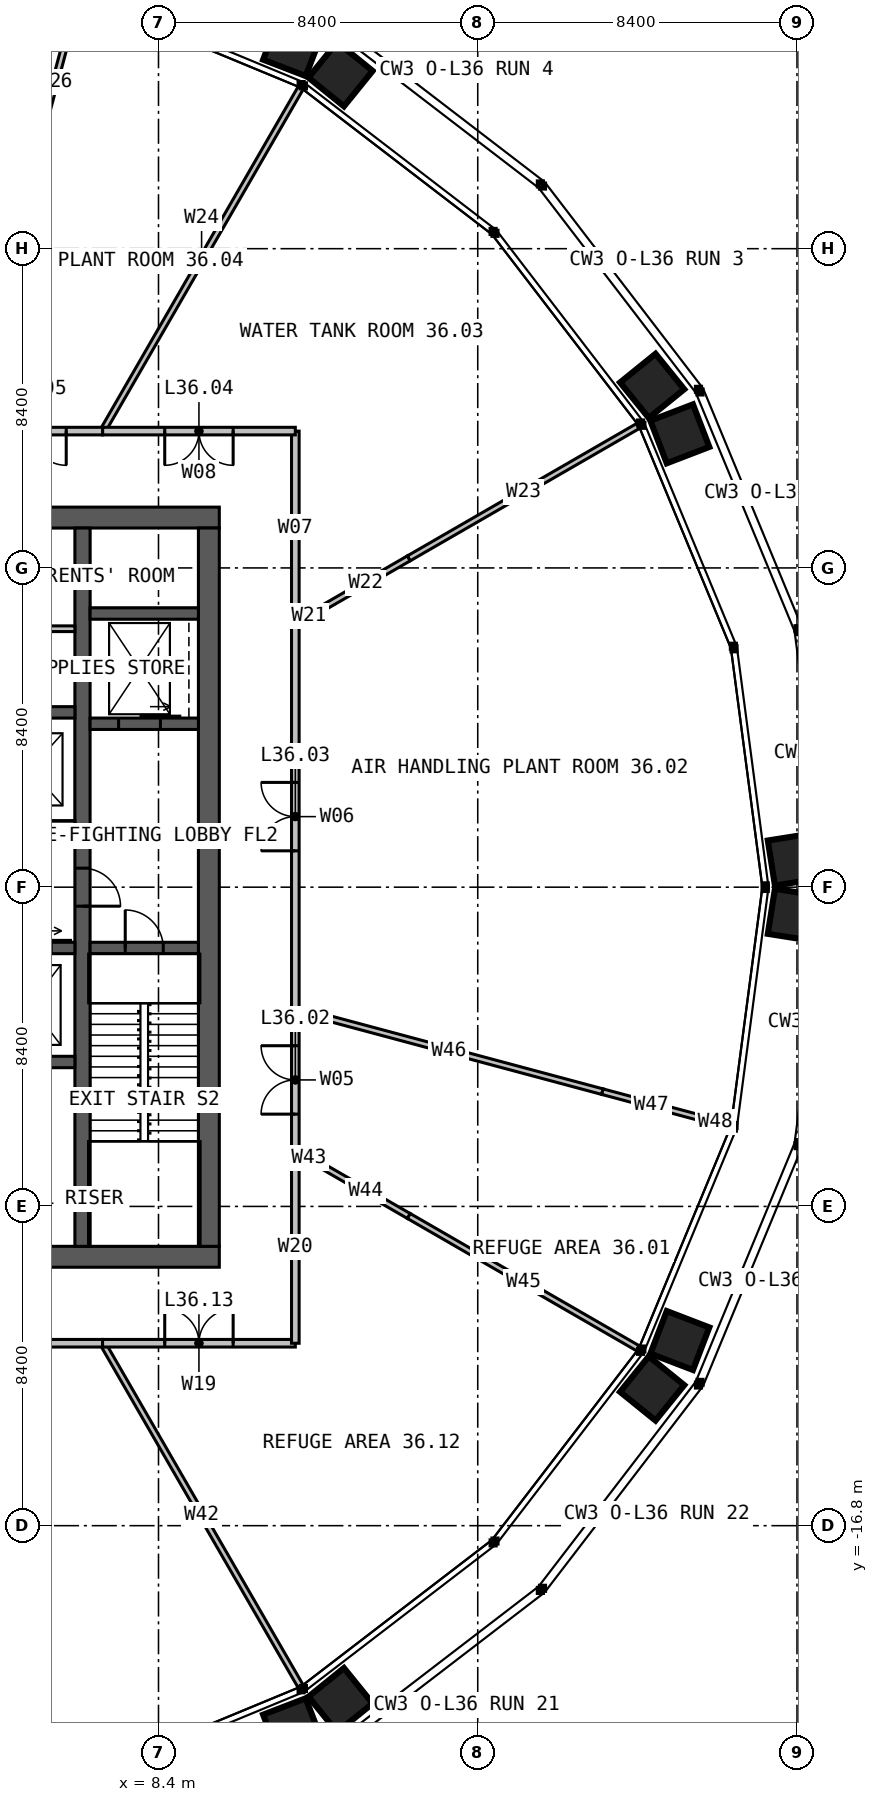
"""IFC4 building model, lengths in metres.
Left out: names, types, materials, properties, quantities, classifications, styles, units other than length and angle.
Written with IfcOpenShell. Run it as: python <this file> out.ifc"""

import sys

from ifc_helpers import new_model, si_unit, direction, frame, frame_2d, origin, place, context, subcontext, project, spatial, rectangle, extrude, element, fill, save


model = new_model("IFC4")
c1 = context("Model", 3, precision=1e-05, world=origin(), true_north=direction((0.0, 1.0)))
c2 = subcontext(c1, "Body", "Model", "MODEL_VIEW")
j1 = project(units=[si_unit("LENGTHUNIT", "METRE"), si_unit("PLANEANGLEUNIT", "RADIAN")], contexts=[c1])
p1 = place(None, origin())
s1 = spatial("IfcSite", under=j1, at=p1, CompositionType="ELEMENT")
p2 = place(p1, origin())
s2 = spatial("IfcBuilding", under=s1, at=p2, CompositionType="ELEMENT")
p3 = place(p2, frame((0.0, 0.0, 150.0)))
s3 = spatial("IfcBuildingStorey", under=s2, at=p3, CompositionType="ELEMENT", Elevation=150.0)
p4 = place(p3, frame((-10.0, 9.725, 0.0), z_axis=(0.0, 0.0, 1.0), x_axis=(1.0, 0.0, 0.0)))
e1 = element("IfcWall", 1, at=p4, inside=s3, PredefinedType="SOLIDWALL", context=c2, shape_type="SweptSolid", body=[
    extrude(rectangle(XDim=20.0, YDim=0.55, at=frame_2d((10.0, 0.0))), origin(), (0.0, 0.0, 1.0), 5.0),
])
p5 = place(p4, frame((9.4, 0.0, 0.0)))
e2 = element("IfcOpeningElement", 2, at=p5, cuts=e1, PredefinedType="OPENING", context=c2, shape_type="SweptSolid", body=[
    extrude(rectangle(XDim=1.2, YDim=2.2, at=frame_2d((0.6, 1.1))), frame((0.0, 0.285, 0.0), z_axis=(0.0, -1.0, 0.0), x_axis=(1.0, 0.0, 0.0)), (0.0, 0.0, 1.0), 0.57),
])
p6 = place(p3, frame((10.0, -9.725, 0.0), z_axis=(0.0, 0.0, 1.0), x_axis=(-1.0, 0.0, 0.0)))
e3 = element("IfcWall", 3, at=p6, inside=s3, PredefinedType="SOLIDWALL", context=c2, shape_type="SweptSolid", body=[
    extrude(rectangle(XDim=20.0, YDim=0.55, at=frame_2d((10.0, 0.0))), origin(), (0.0, 0.0, 1.0), 5.0),
])
p7 = place(p6, frame((6.875, 0.0, 0.0)))
e4 = element("IfcOpeningElement", 4, at=p7, cuts=e3, PredefinedType="OPENING", context=c2, shape_type="SweptSolid", body=[
    extrude(rectangle(XDim=1.2, YDim=2.2, at=frame_2d((0.6, 1.1))), frame((0.0, 0.285, 0.0), z_axis=(0.0, -1.0, 0.0), x_axis=(1.0, 0.0, 0.0)), (0.0, 0.0, 1.0), 0.57),
])
p8 = place(p3, frame((9.725, -9.45, 0.0), z_axis=(0.0, 0.0, 1.0), x_axis=(0.0, 1.0, 0.0)))
e5 = element("IfcWall", 5, at=p8, inside=s3, PredefinedType="SOLIDWALL", context=c2, shape_type="SweptSolid", body=[
    extrude(rectangle(XDim=18.9, YDim=0.55, at=frame_2d((9.45, 0.0))), origin(), (0.0, 0.0, 1.0), 5.0),
])
p9 = place(p3, frame((6.4, 9.45, 0.0), z_axis=(0.0, 0.0, 1.0), x_axis=(0.0, -1.0, 0.0)))
e6 = element("IfcWall", 6, at=p9, inside=s3, PredefinedType="SOLIDWALL", context=c2, shape_type="SweptSolid", body=[
    extrude(rectangle(XDim=18.9, YDim=0.4, at=frame_2d((9.45, 0.0))), origin(), (0.0, 0.0, 1.0), 5.0),
])
p10 = place(p9, frame((8.95, 0.0, 0.0)))
e7 = element("IfcOpeningElement", 7, at=p10, cuts=e6, PredefinedType="OPENING", context=c2, shape_type="SweptSolid", body=[
    extrude(rectangle(XDim=1.0, YDim=2.2, at=frame_2d((0.5, 1.1))), frame((0.0, 0.21, 0.0), z_axis=(0.0, -1.0, 0.0), x_axis=(1.0, 0.0, 0.0)), (0.0, 0.0, 1.0), 0.42),
])
for number, where, z_axis, x_axis in (
    (8, (1.35, 1.6, 0.0), (0.0, 0.0, 1.0), (1.0, 0.0, 0.0)),
    (9, (1.35, 4.6, 0.0), (0.0, 0.0, 1.0), (1.0, 0.0, 0.0)),
):
    element("IfcWall", number, at=place(p3, frame(where, z_axis=z_axis, x_axis=x_axis)), inside=s3, PredefinedType="SOLIDWALL", context=c2, shape_type="SweptSolid", body=[
        extrude(rectangle(XDim=4.85, YDim=0.3, at=frame_2d((2.425, 0.0))), origin(), (0.0, 0.0, 1.0), 5.0),
    ])
p11 = place(p3, frame((3.85, -1.6, 0.0), z_axis=(0.0, 0.0, 1.0), x_axis=(1.0, 0.0, 0.0)))
e10 = element("IfcWall", 10, at=p11, inside=s3, PredefinedType="SOLIDWALL", context=c2, shape_type="SweptSolid", body=[
    extrude(rectangle(XDim=2.35, YDim=0.3, at=frame_2d((1.175, 0.0))), origin(), (0.0, 0.0, 1.0), 5.0),
])
p12 = place(p11, frame((0.625, 0.0, 0.0)))
e11 = element("IfcOpeningElement", 11, at=p12, cuts=e10, PredefinedType="OPENING", context=c2, shape_type="SweptSolid", body=[
    extrude(rectangle(XDim=1.1, YDim=2.2, at=frame_2d((0.55, 1.1))), frame((0.0, 0.16, 0.0), z_axis=(0.0, -1.0, 0.0), x_axis=(1.0, 0.0, 0.0)), (0.0, 0.0, 1.0), 0.32),
])
p13 = place(p3, frame((3.85, -4.6, 0.0), z_axis=(0.0, 0.0, 1.0), x_axis=(1.0, 0.0, 0.0)))
e12 = element("IfcWall", 12, at=p13, inside=s3, PredefinedType="SOLIDWALL", context=c2, shape_type="SweptSolid", body=[
    extrude(rectangle(XDim=2.35, YDim=0.3, at=frame_2d((1.175, 0.0))), origin(), (0.0, 0.0, 1.0), 5.0),
])
p14 = place(p3, frame((6.6, -1.6, 0.0), z_axis=(0.0, 0.0, 1.0), x_axis=(1.0, 0.0, 0.0)))
e13 = element("IfcWall", 13, at=p14, inside=s3, PredefinedType="SOLIDWALL", context=c2, shape_type="SweptSolid", body=[
    extrude(rectangle(XDim=2.85, YDim=0.3, at=frame_2d((1.425, 0.0))), origin(), (0.0, 0.0, 1.0), 5.0),
])
p15 = place(p14, frame((0.925, 0.0, 0.0)))
e14 = element("IfcOpeningElement", 14, at=p15, cuts=e13, PredefinedType="OPENING", context=c2, shape_type="SweptSolid", body=[
    extrude(rectangle(XDim=1.0, YDim=2.2, at=frame_2d((0.5, 1.1))), frame((0.0, 0.16, 0.0), z_axis=(0.0, -1.0, 0.0), x_axis=(1.0, 0.0, 0.0)), (0.0, 0.0, 1.0), 0.32),
])
p16 = place(p3, frame((6.6, 4.3, 0.0), z_axis=(0.0, 0.0, 1.0), x_axis=(1.0, 0.0, 0.0)))
e15 = element("IfcWall", 15, at=p16, inside=s3, PredefinedType="SOLIDWALL", context=c2, shape_type="SweptSolid", body=[
    extrude(rectangle(XDim=2.85, YDim=0.3, at=frame_2d((1.425, 0.0))), origin(), (0.0, 0.0, 1.0), 5.0),
])
p17 = place(p16, frame((0.75, 0.0, 0.0)))
e16 = element("IfcOpeningElement", 16, at=p17, cuts=e15, PredefinedType="OPENING", context=c2, shape_type="SweptSolid", body=[
    extrude(rectangle(XDim=1.1, YDim=2.2, at=frame_2d((0.55, 1.1))), frame((0.0, 0.16, 0.0), z_axis=(0.0, -1.0, 0.0), x_axis=(1.0, 0.0, 0.0)), (0.0, 0.0, 1.0), 0.32),
])
p18 = place(p3, frame((6.6, 7.2, 0.0), z_axis=(0.0, 0.0, 1.0), x_axis=(1.0, 0.0, 0.0)))
e17 = element("IfcWall", 17, at=p18, inside=s3, PredefinedType="SOLIDWALL", context=c2, shape_type="SweptSolid", body=[
    extrude(rectangle(XDim=2.85, YDim=0.3, at=frame_2d((1.425, 0.0))), origin(), (0.0, 0.0, 1.0), 5.0),
])
p19 = place(p3, frame((1.35, 6.8, 0.0), z_axis=(0.0, 0.0, 1.0), x_axis=(1.0, 0.0, 0.0)))
e18 = element("IfcWall", 18, at=p19, inside=s3, PredefinedType="PARTITIONING", context=c2, shape_type="SweptSolid", body=[
    extrude(rectangle(XDim=4.85, YDim=0.15, at=frame_2d((2.425, 0.0))), origin(), (0.0, 0.0, 1.0), 4.75),
])
p20 = place(p19, frame((3.15, 0.0, 0.0)))
e19 = element("IfcOpeningElement", 19, at=p20, cuts=e18, PredefinedType="OPENING", context=c2, shape_type="SweptSolid", body=[
    extrude(rectangle(XDim=0.9, YDim=2.2, at=frame_2d((0.45, 1.1))), frame((0.0, 0.085, 0.0), z_axis=(0.0, -1.0, 0.0), x_axis=(1.0, 0.0, 0.0)), (0.0, 0.0, 1.0), 0.17),
])
p21 = place(p3, frame((12.0, -6.928, 0.0), z_axis=(0.0, 0.0, 1.0), x_axis=(0.86608282171, -0.499900536046, 0.0)))
e20 = element("IfcWall", 20, at=p21, inside=s3, PredefinedType="PARTITIONING", context=c2, shape_type="SweptSolid", body=[
    extrude(rectangle(XDim=0.831, YDim=0.15, at=frame_2d((0.416, 0.0))), origin(), (0.0, 0.0, 1.0), 4.8),
])
p22 = place(p3, frame((12.719, -7.344, 0.0), z_axis=(0.0, 0.0, 1.0), x_axis=(0.866002361659, -0.500039908008, 0.0)))
e21 = element("IfcWall", 21, at=p22, inside=s3, PredefinedType="PARTITIONING", context=c2, shape_type="SweptSolid", body=[
    extrude(rectangle(XDim=2.618, YDim=0.15, at=frame_2d((1.309, 0.0))), origin(), (0.0, 0.0, 1.0), 3.79),
])
p23 = place(p3, frame((14.987, -8.653, 0.0), z_axis=(0.0, 0.0, 1.0), x_axis=(0.86602409414, -0.500002268364, 0.0)))
e22 = element("IfcWall", 22, at=p23, inside=s3, PredefinedType="PARTITIONING", context=c2, shape_type="SweptSolid", body=[
    extrude(rectangle(XDim=6.974, YDim=0.15, at=frame_2d((3.487, 0.0))), origin(), (0.0, 0.0, 1.0), 4.8),
])
p24 = place(p3, frame((12.0, -3.215, 0.0), z_axis=(0.0, 0.0, 1.0), x_axis=(0.965920824038, -0.258837713037, 0.0)))
e23 = element("IfcWall", 23, at=p24, inside=s3, PredefinedType="PARTITIONING", context=c2, shape_type="SweptSolid", body=[
    extrude(rectangle(XDim=8.365, YDim=0.15, at=frame_2d((4.183, 0.0))), origin(), (0.0, 0.0, 1.0), 4.8),
])
p25 = place(p3, frame((20.08, -5.381, 0.0), z_axis=(0.0, 0.0, 1.0), x_axis=(0.965936190415, -0.258780362559, 0.0)))
e24 = element("IfcWall", 24, at=p25, inside=s3, PredefinedType="PARTITIONING", context=c2, shape_type="SweptSolid", body=[
    extrude(rectangle(XDim=2.664, YDim=0.15, at=frame_2d((1.332, 0.0))), origin(), (0.0, 0.0, 1.0), 3.79),
])
p26 = place(p3, frame((22.654, -6.07, 0.0), z_axis=(0.0, 0.0, 1.0), x_axis=(0.96592035307, -0.258839470569, 0.0)))
e25 = element("IfcWall", 25, at=p26, inside=s3, PredefinedType="PARTITIONING", context=c2, shape_type="SweptSolid", body=[
    extrude(rectangle(XDim=0.826, YDim=0.15, at=frame_2d((0.413, 0.0))), origin(), (0.0, 0.0, 1.0), 4.8),
])
p27 = place(p3, frame((12.0, 6.928, 0.0), z_axis=(0.0, 0.0, 1.0), x_axis=(0.86608282171, 0.499900536046, 0.0)))
e26 = element("IfcWall", 26, at=p27, inside=s3, PredefinedType="PARTITIONING", context=c2, shape_type="SweptSolid", body=[
    extrude(rectangle(XDim=0.831, YDim=0.15, at=frame_2d((0.416, 0.0))), origin(), (0.0, 0.0, 1.0), 4.8),
])
p28 = place(p3, frame((12.719, 7.344, 0.0), z_axis=(0.0, 0.0, 1.0), x_axis=(0.866002361659, 0.500039908008, 0.0)))
e27 = element("IfcWall", 27, at=p28, inside=s3, PredefinedType="PARTITIONING", context=c2, shape_type="SweptSolid", body=[
    extrude(rectangle(XDim=2.618, YDim=0.15, at=frame_2d((1.309, 0.0))), origin(), (0.0, 0.0, 1.0), 3.79),
])
p29 = place(p3, frame((14.987, 8.653, 0.0), z_axis=(0.0, 0.0, 1.0), x_axis=(0.86602409414, 0.500002268364, 0.0)))
e28 = element("IfcWall", 28, at=p29, inside=s3, PredefinedType="PARTITIONING", context=c2, shape_type="SweptSolid", body=[
    extrude(rectangle(XDim=6.974, YDim=0.15, at=frame_2d((3.487, 0.0))), origin(), (0.0, 0.0, 1.0), 4.8),
])
p30 = place(p3, frame((6.928, 12.0, 0.0), z_axis=(0.0, 0.0, 1.0), x_axis=(0.500003616288, 0.866023315909, 0.0)))
e29 = element("IfcWall", 29, at=p30, inside=s3, PredefinedType="PARTITIONING", context=c2, shape_type="SweptSolid", body=[
    extrude(rectangle(XDim=10.423, YDim=0.15, at=frame_2d((5.211, 0.0))), origin(), (0.0, 0.0, 1.0), 4.8),
])
p31 = place(p3, frame((5.279, 19.702, 0.0), z_axis=(0.0, 0.0, 1.0), x_axis=(0.258819472716, 0.96592571171, 0.0)))
e30 = element("IfcWall", 30, at=p31, inside=s3, PredefinedType="PARTITIONING", context=c2, shape_type="SweptSolid", body=[
    extrude(rectangle(XDim=3.073, YDim=0.15, at=frame_2d((1.537, 0.0))), origin(), (0.0, 0.0, 1.0), 3.79),
])
p32 = place(p3, frame((6.928, -12.0, 0.0), z_axis=(0.0, 0.0, 1.0), x_axis=(0.500003616288, -0.866023315909, 0.0)))
e31 = element("IfcWall", 31, at=p32, inside=s3, PredefinedType="PARTITIONING", context=c2, shape_type="SweptSolid", body=[
    extrude(rectangle(XDim=10.423, YDim=0.15, at=frame_2d((5.211, 0.0))), origin(), (0.0, 0.0, 1.0), 4.8),
])
p33 = place(p3, frame((12.0, -6.928, 0.0), z_axis=(0.0, 0.0, 1.0), x_axis=(0.0, 1.0, 0.0)))
e32 = element("IfcWall", 32, at=p33, inside=s3, PredefinedType="PARTITIONING", context=c2, shape_type="SweptSolid", body=[
    extrude(rectangle(XDim=3.713, YDim=0.2, at=frame_2d((1.856, 0.0))), origin(), (0.0, 0.0, 1.0), 4.8),
])
p34 = place(p33, frame((0.956, 0.0, 0.0)))
e33 = element("IfcOpeningElement", 33, at=p34, cuts=e32, PredefinedType="OPENING", context=c2, shape_type="SweptSolid", body=[
    extrude(rectangle(XDim=1.8, YDim=2.2, at=frame_2d((0.9, 1.1))), frame((0.0, 0.11, 0.0), z_axis=(0.0, -1.0, 0.0), x_axis=(1.0, 0.0, 0.0)), (0.0, 0.0, 1.0), 0.22),
])
p35 = place(p3, frame((12.0, -3.215, 0.0), z_axis=(0.0, 0.0, 1.0), x_axis=(0.0, 1.0, 0.0)))
e34 = element("IfcWall", 34, at=p35, inside=s3, PredefinedType="PARTITIONING", context=c2, shape_type="SweptSolid", body=[
    extrude(rectangle(XDim=10.144, YDim=0.2, at=frame_2d((5.072, 0.0))), origin(), (0.0, 0.0, 1.0), 4.8),
])
p36 = place(p35, frame((4.172, 0.0, 0.0)))
e35 = element("IfcOpeningElement", 35, at=p36, cuts=e34, PredefinedType="OPENING", context=c2, shape_type="SweptSolid", body=[
    extrude(rectangle(XDim=1.8, YDim=2.2, at=frame_2d((0.9, 1.1))), frame((0.0, 0.11, 0.0), z_axis=(0.0, -1.0, 0.0), x_axis=(1.0, 0.0, 0.0)), (0.0, 0.0, 1.0), 0.22),
])
p37 = place(p3, frame((12.0, 6.928, 0.0), z_axis=(0.0, 0.0, 1.0), x_axis=(0.0, 1.0, 0.0)))
e36 = element("IfcWall", 36, at=p37, inside=s3, PredefinedType="PARTITIONING", context=c2, shape_type="SweptSolid", body=[
    extrude(rectangle(XDim=5.072, YDim=0.2, at=frame_2d((2.536, 0.0))), origin(), (0.0, 0.0, 1.0), 4.8),
])
p38 = place(p3, frame((12.0, 12.0, 0.0), z_axis=(0.0, 0.0, 1.0), x_axis=(-1.0, 0.0, 0.0)))
e37 = element("IfcWall", 37, at=p38, inside=s3, PredefinedType="PARTITIONING", context=c2, shape_type="SweptSolid", body=[
    extrude(rectangle(XDim=5.072, YDim=0.2, at=frame_2d((2.536, 0.0))), origin(), (0.0, 0.0, 1.0), 4.8),
])
p39 = place(p38, frame((1.636, 0.0, 0.0)))
e38 = element("IfcOpeningElement", 38, at=p39, cuts=e37, PredefinedType="OPENING", context=c2, shape_type="SweptSolid", body=[
    extrude(rectangle(XDim=1.8, YDim=2.2, at=frame_2d((0.9, 1.1))), frame((0.0, 0.11, 0.0), z_axis=(0.0, -1.0, 0.0), x_axis=(1.0, 0.0, 0.0)), (0.0, 0.0, 1.0), 0.22),
])
p40 = place(p3, frame((6.928, 12.0, 0.0), z_axis=(0.0, 0.0, 1.0), x_axis=(-1.0, 0.0, 0.0)))
e39 = element("IfcWall", 39, at=p40, inside=s3, PredefinedType="PARTITIONING", context=c2, shape_type="SweptSolid", body=[
    extrude(rectangle(XDim=3.713, YDim=0.2, at=frame_2d((1.856, 0.0))), origin(), (0.0, 0.0, 1.0), 4.8),
])
p41 = place(p40, frame((0.956, 0.0, 0.0)))
e40 = element("IfcOpeningElement", 40, at=p41, cuts=e39, PredefinedType="OPENING", context=c2, shape_type="SweptSolid", body=[
    extrude(rectangle(XDim=1.8, YDim=2.2, at=frame_2d((0.9, 1.1))), frame((0.0, 0.11, 0.0), z_axis=(0.0, -1.0, 0.0), x_axis=(1.0, 0.0, 0.0)), (0.0, 0.0, 1.0), 0.22),
])
p42 = place(p3, frame((-3.215, -12.0, 0.0), z_axis=(0.0, 0.0, 1.0), x_axis=(1.0, 0.0, 0.0)))
e41 = element("IfcWall", 41, at=p42, inside=s3, PredefinedType="PARTITIONING", context=c2, shape_type="SweptSolid", body=[
    extrude(rectangle(XDim=10.144, YDim=0.2, at=frame_2d((5.072, 0.0))), origin(), (0.0, 0.0, 1.0), 4.8),
])
p43 = place(p42, frame((4.172, 0.0, 0.0)))
e42 = element("IfcOpeningElement", 42, at=p43, cuts=e41, PredefinedType="OPENING", context=c2, shape_type="SweptSolid", body=[
    extrude(rectangle(XDim=1.8, YDim=2.2, at=frame_2d((0.9, 1.1))), frame((0.0, 0.11, 0.0), z_axis=(0.0, -1.0, 0.0), x_axis=(1.0, 0.0, 0.0)), (0.0, 0.0, 1.0), 0.22),
])
p44 = place(p3, frame((6.928, -12.0, 0.0), z_axis=(0.0, 0.0, 1.0), x_axis=(1.0, 0.0, 0.0)))
e43 = element("IfcWall", 43, at=p44, inside=s3, PredefinedType="PARTITIONING", context=c2, shape_type="SweptSolid", body=[
    extrude(rectangle(XDim=5.072, YDim=0.2, at=frame_2d((2.536, 0.0))), origin(), (0.0, 0.0, 1.0), 4.8),
])
p45 = place(p44, frame((1.636, 0.0, 0.0)))
e44 = element("IfcOpeningElement", 44, at=p45, cuts=e43, PredefinedType="OPENING", context=c2, shape_type="SweptSolid", body=[
    extrude(rectangle(XDim=1.8, YDim=2.2, at=frame_2d((0.9, 1.1))), frame((0.0, 0.11, 0.0), z_axis=(0.0, -1.0, 0.0), x_axis=(1.0, 0.0, 0.0)), (0.0, 0.0, 1.0), 0.22),
])
p46 = place(p3, frame((12.0, -12.0, 0.0), z_axis=(0.0, 0.0, 1.0), x_axis=(0.0, 1.0, 0.0)))
e45 = element("IfcWall", 45, at=p46, inside=s3, PredefinedType="PARTITIONING", context=c2, shape_type="SweptSolid", body=[
    extrude(rectangle(XDim=5.072, YDim=0.2, at=frame_2d((2.536, 0.0))), origin(), (0.0, 0.0, 1.0), 4.8),
])
p47 = place(p10, origin())
e46 = element("IfcDoor", 46, at=p47, inside=s3, OperationType="SINGLE_SWING_RIGHT", PredefinedType="DOOR", context=c2, shape_type="SweptSolid", body=[
    extrude(rectangle(XDim=1.0, YDim=2.2, at=frame_2d((0.5, 1.1))), frame((0.0, 0.025, 0.0), z_axis=(0.0, -1.0, 0.0), x_axis=(1.0, 0.0, 0.0)), (0.0, 0.0, 1.0), 0.05),
])
fill(e7, e46)
p48 = place(p15, origin())
e47 = element("IfcDoor", 47, at=p48, inside=s3, OperationType="SINGLE_SWING_LEFT", PredefinedType="DOOR", context=c2, shape_type="SweptSolid", body=[
    extrude(rectangle(XDim=1.0, YDim=2.2, at=frame_2d((0.5, 1.1))), frame((0.0, 0.025, 0.0), z_axis=(0.0, -1.0, 0.0), x_axis=(1.0, 0.0, 0.0)), (0.0, 0.0, 1.0), 0.05),
])
fill(e14, e47)
p49 = place(p17, origin())
e48 = element("IfcDoor", 48, at=p49, inside=s3, OperationType="SLIDING_TO_LEFT", PredefinedType="DOOR", context=c2, shape_type="SweptSolid", body=[
    extrude(rectangle(XDim=1.1, YDim=2.2, at=frame_2d((0.55, 1.1))), frame((0.0, 0.025, 0.0), z_axis=(0.0, -1.0, 0.0), x_axis=(1.0, 0.0, 0.0)), (0.0, 0.0, 1.0), 0.05),
])
fill(e16, e48)
p50 = place(p34, origin())
e49 = element("IfcDoor", 49, at=p50, inside=s3, OperationType="DOUBLE_DOOR_SINGLE_SWING", PredefinedType="DOOR", context=c2, shape_type="SweptSolid", body=[
    extrude(rectangle(XDim=1.8, YDim=2.2, at=frame_2d((0.9, 1.1))), frame((0.0, 0.025, 0.0), z_axis=(0.0, -1.0, 0.0), x_axis=(1.0, 0.0, 0.0)), (0.0, 0.0, 1.0), 0.05),
])
fill(e33, e49)
p51 = place(p36, origin())
e50 = element("IfcDoor", 50, at=p51, inside=s3, OperationType="DOUBLE_DOOR_SINGLE_SWING", PredefinedType="DOOR", context=c2, shape_type="SweptSolid", body=[
    extrude(rectangle(XDim=1.8, YDim=2.2, at=frame_2d((0.9, 1.1))), frame((0.0, 0.025, 0.0), z_axis=(0.0, -1.0, 0.0), x_axis=(1.0, 0.0, 0.0)), (0.0, 0.0, 1.0), 0.05),
])
fill(e35, e50)
p52 = place(p39, origin())
e51 = element("IfcDoor", 51, at=p52, inside=s3, OperationType="DOUBLE_DOOR_SINGLE_SWING", PredefinedType="DOOR", context=c2, shape_type="SweptSolid", body=[
    extrude(rectangle(XDim=1.8, YDim=2.2, at=frame_2d((0.9, 1.1))), frame((0.0, 0.025, 0.0), z_axis=(0.0, -1.0, 0.0), x_axis=(1.0, 0.0, 0.0)), (0.0, 0.0, 1.0), 0.05),
])
fill(e38, e51)
p53 = place(p41, origin())
e52 = element("IfcDoor", 52, at=p53, inside=s3, OperationType="DOUBLE_DOOR_SINGLE_SWING", PredefinedType="DOOR", context=c2, shape_type="SweptSolid", body=[
    extrude(rectangle(XDim=1.8, YDim=2.2, at=frame_2d((0.9, 1.1))), frame((0.0, 0.025, 0.0), z_axis=(0.0, -1.0, 0.0), x_axis=(1.0, 0.0, 0.0)), (0.0, 0.0, 1.0), 0.05),
])
fill(e40, e52)
p54 = place(p45, origin())
e53 = element("IfcDoor", 53, at=p54, inside=s3, OperationType="DOUBLE_DOOR_SINGLE_SWING", PredefinedType="DOOR", context=c2, shape_type="SweptSolid", body=[
    extrude(rectangle(XDim=1.8, YDim=2.2, at=frame_2d((0.9, 1.1))), frame((0.0, 0.025, 0.0), z_axis=(0.0, -1.0, 0.0), x_axis=(1.0, 0.0, 0.0)), (0.0, 0.0, 1.0), 0.05),
])
fill(e44, e53)
save(model, sys.argv[1])
